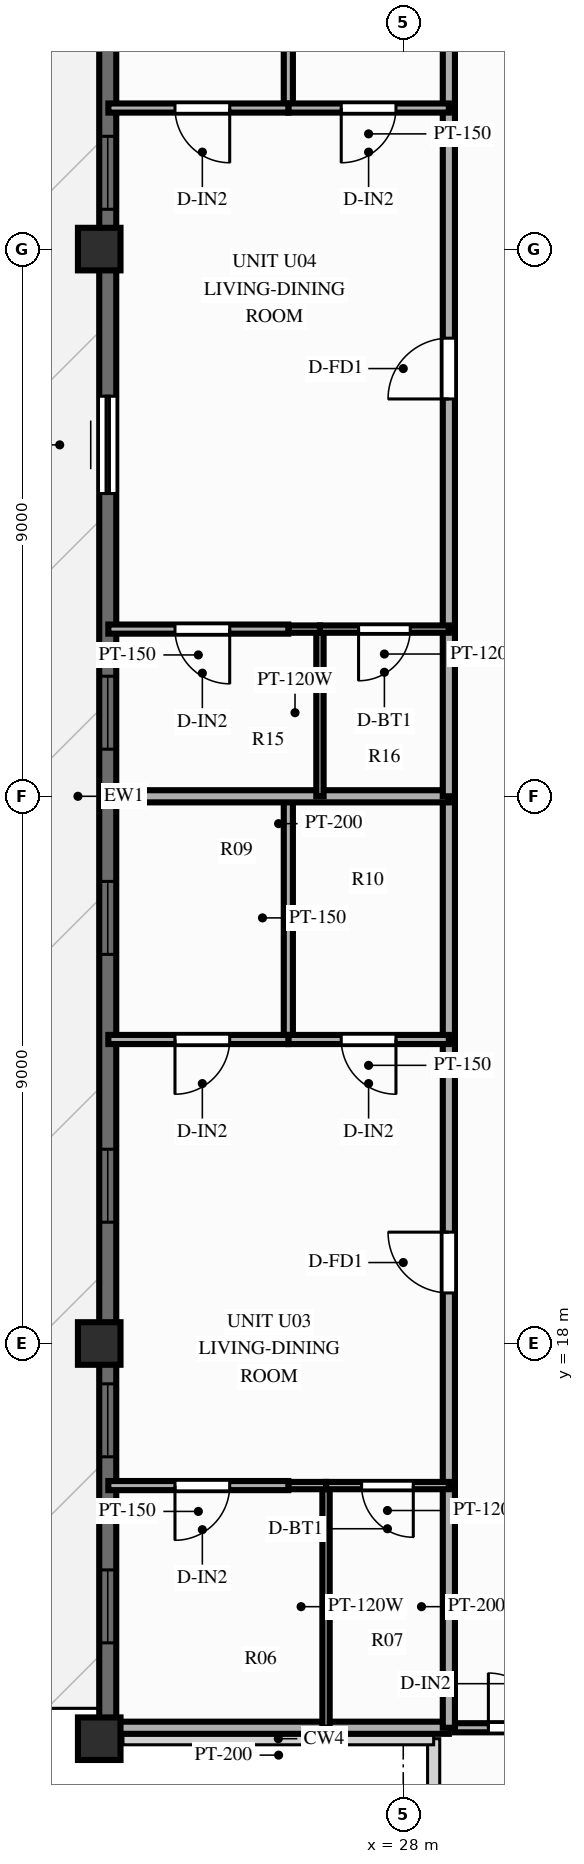
"""IFC4 building model, lengths in metres.
Left out: names, types, materials, properties, quantities, classifications, styles, units other than length and angle.
Written with IfcOpenShell. Run it as: python <this file> out.ifc"""

import sys

from ifc_helpers import new_model, si_unit, direction, frame, frame_2d, origin, origin_2d, place, context, subcontext, project, spatial, rectangle, extrude, source, transform, mapped, element, fill, save


model = new_model("IFC4")
c1 = context("Model", 3, precision=1e-05, world=origin(), true_north=direction((0.0, 1.0)))
c2 = subcontext(c1, "Body", "Model", "MODEL_VIEW")
j1 = project(units=[si_unit("LENGTHUNIT", "METRE"), si_unit("PLANEANGLEUNIT", "RADIAN")], contexts=[c1])
p1 = place(None, origin())
s1 = spatial("IfcSite", under=j1, at=p1, CompositionType="ELEMENT")
p2 = place(p1, origin())
s2 = spatial("IfcBuilding", under=s1, at=p2, CompositionType="ELEMENT")
p3 = place(p2, frame((0.0, 0.0, 246.0)))
s3 = spatial("IfcBuildingStorey", under=s2, at=p3, CompositionType="ELEMENT", Elevation=246.0)
m1 = source(origin(), c2, "Body", "SweptSolid", [
    extrude(rectangle(XDim=0.7, YDim=0.7, at=origin_2d()), origin(), (0.0, 0.0, 1.0), 3.0),
])
for number, where, z_axis, x_axis in (
    (1, (23.0, 36.0, 0.0), (0.0, 0.0, 1.0), (1.0, 0.0, 0.0)),
    (2, (23.0, 18.0, 0.0), (0.0, 0.0, 1.0), (1.0, 0.0, 0.0)),
    (3, (23.0, 11.5, 0.0), (0.0, 0.0, 1.0), (1.0, 0.0, 0.0)),
):
    element("IfcColumn", number, at=place(p3, frame(where, z_axis=z_axis, x_axis=x_axis)), inside=s3, PredefinedType="COLUMN", context=c2, shape_type="MappedRepresentation", body=[
        mapped(m1, transform((0.0, 0.0, 0.0), scale=1.0)),
    ])
p4 = place(p3, frame((23.14, 11.5, 0.0), z_axis=(0.0, 0.0, 1.0), x_axis=(0.0, 1.0, 0.0)))
e4 = element("IfcWall", 4, at=p4, inside=s3, PredefinedType="SOLIDWALL", context=c2, shape_type="SweptSolid", body=[
    extrude(rectangle(XDim=31.0, YDim=0.28, at=frame_2d((15.5, 0.0))), origin(), (0.0, 0.0, 1.0), 2.28),
])
p5 = place(p4, frame((1.577, 0.0, 0.25)))
e5 = element("IfcOpeningElement", 5, at=p5, cuts=e4, PredefinedType="OPENING", context=c2, shape_type="SweptSolid", body=[
    extrude(rectangle(XDim=1.2, YDim=1.5, at=frame_2d((0.6, 0.75))), frame((0.0, 0.152, 0.0), z_axis=(0.0, -1.0, 0.0), x_axis=(1.0, 0.0, 0.0)), (0.0, 0.0, 1.0), 0.304),
])
p6 = place(p4, frame((4.637, 0.0, 0.25)))
e6 = element("IfcOpeningElement", 6, at=p6, cuts=e4, PredefinedType="OPENING", context=c2, shape_type="SweptSolid", body=[
    extrude(rectangle(XDim=1.2, YDim=1.5, at=frame_2d((0.6, 0.75))), frame((0.0, 0.152, 0.0), z_axis=(0.0, -1.0, 0.0), x_axis=(1.0, 0.0, 0.0)), (0.0, 0.0, 1.0), 0.304),
])
p7 = place(p4, frame((8.495, 0.0, 0.25)))
e7 = element("IfcOpeningElement", 7, at=p7, cuts=e4, PredefinedType="OPENING", context=c2, shape_type="SweptSolid", body=[
    extrude(rectangle(XDim=1.2, YDim=1.5, at=frame_2d((0.6, 0.75))), frame((0.0, 0.152, 0.0), z_axis=(0.0, -1.0, 0.0), x_axis=(1.0, 0.0, 0.0)), (0.0, 0.0, 1.0), 0.304),
])
p8 = place(p4, frame((12.9, 0.0, 0.25)))
e8 = element("IfcOpeningElement", 8, at=p8, cuts=e4, PredefinedType="OPENING", context=c2, shape_type="SweptSolid", body=[
    extrude(rectangle(XDim=1.2, YDim=1.5, at=frame_2d((0.6, 0.75))), frame((0.0, 0.152, 0.0), z_axis=(0.0, -1.0, 0.0), x_axis=(1.0, 0.0, 0.0)), (0.0, 0.0, 1.0), 0.304),
])
p9 = place(p4, frame((16.275, 0.0, 0.25)))
e9 = element("IfcOpeningElement", 9, at=p9, cuts=e4, PredefinedType="OPENING", context=c2, shape_type="SweptSolid", body=[
    extrude(rectangle(XDim=1.2, YDim=1.5, at=frame_2d((0.6, 0.75))), frame((0.0, 0.152, 0.0), z_axis=(0.0, -1.0, 0.0), x_axis=(1.0, 0.0, 0.0)), (0.0, 0.0, 1.0), 0.304),
])
p10 = place(p4, frame((20.48, 0.0, 0.0)))
e10 = element("IfcOpeningElement", 10, at=p10, cuts=e4, PredefinedType="OPENING", context=c2, shape_type="SweptSolid", body=[
    extrude(rectangle(XDim=1.6, YDim=2.15, at=frame_2d((0.8, 1.075))), frame((0.0, 0.152, 0.0), z_axis=(0.0, -1.0, 0.0), x_axis=(1.0, 0.0, 0.0)), (0.0, 0.0, 1.0), 0.304),
])
p11 = place(p4, frame((25.155, 0.0, 0.25)))
e11 = element("IfcOpeningElement", 11, at=p11, cuts=e4, PredefinedType="OPENING", context=c2, shape_type="SweptSolid", body=[
    extrude(rectangle(XDim=1.2, YDim=1.5, at=frame_2d((0.6, 0.75))), frame((0.0, 0.152, 0.0), z_axis=(0.0, -1.0, 0.0), x_axis=(1.0, 0.0, 0.0)), (0.0, 0.0, 1.0), 0.304),
])
p12 = place(p4, frame((28.215, 0.0, 0.25)))
e12 = element("IfcOpeningElement", 12, at=p12, cuts=e4, PredefinedType="OPENING", context=c2, shape_type="SweptSolid", body=[
    extrude(rectangle(XDim=1.2, YDim=1.5, at=frame_2d((0.6, 0.75))), frame((0.0, 0.152, 0.0), z_axis=(0.0, -1.0, 0.0), x_axis=(1.0, 0.0, 0.0)), (0.0, 0.0, 1.0), 0.304),
])
p13 = place(p3, frame((28.85, 11.68, 0.0), z_axis=(0.0, 0.0, 1.0), x_axis=(1.0, 0.0, 0.0)))
e13 = element("IfcWall", 13, at=p13, inside=s3, PredefinedType="PARTITIONING", context=c2, shape_type="SweptSolid", body=[
    extrude(rectangle(XDim=2.33, YDim=0.15, at=frame_2d((1.165, 0.0))), origin(), (0.0, 0.0, 1.0), 2.74),
])
p14 = place(p13, frame((0.55, 0.0, 0.0)))
e14 = element("IfcOpeningElement", 14, at=p14, cuts=e13, PredefinedType="OPENING", context=c2, shape_type="SweptSolid", body=[
    extrude(rectangle(XDim=0.9, YDim=2.1, at=frame_2d((0.45, 1.05))), frame((0.0, 0.087, 0.0), z_axis=(0.0, -1.0, 0.0), x_axis=(1.0, 0.0, 0.0)), (0.0, 0.0, 1.0), 0.174),
])
p15 = place(p3, frame((28.75, 11.68, 0.0), z_axis=(0.0, 0.0, 1.0), x_axis=(-1.0, 0.0, 0.0)))
e15 = element("IfcWall", 15, at=p15, inside=s3, PredefinedType="PARTITIONING", context=c2, shape_type="SweptSolid", body=[
    extrude(rectangle(XDim=5.6, YDim=0.2, at=frame_2d((2.8, 0.0))), origin(), (0.0, 0.0, 1.0), 2.74),
])
p16 = place(p3, frame((28.75, 11.68, 0.0), z_axis=(0.0, 0.0, 1.0), x_axis=(0.0, 1.0, 0.0)))
e16 = element("IfcWall", 16, at=p16, inside=s3, PredefinedType="PARTITIONING", context=c2, shape_type="SweptSolid", body=[
    extrude(rectangle(XDim=3.983, YDim=0.2, at=frame_2d((1.992, 0.0))), origin(), (0.0, 0.0, 1.0), 2.74),
])
p17 = place(p3, frame((28.75, 15.663, 0.0), z_axis=(0.0, 0.0, 1.0), x_axis=(0.0, 1.0, 0.0)))
e17 = element("IfcWall", 17, at=p17, inside=s3, PredefinedType="PARTITIONING", context=c2, shape_type="SweptSolid", body=[
    extrude(rectangle(XDim=7.337, YDim=0.2, at=frame_2d((3.668, 0.0))), origin(), (0.0, 0.0, 1.0), 2.74),
])
p18 = place(p17, frame((3.168, 0.0, 0.0)))
e18 = element("IfcOpeningElement", 18, at=p18, cuts=e17, PredefinedType="OPENING", context=c2, shape_type="SweptSolid", body=[
    extrude(rectangle(XDim=1.0, YDim=2.15, at=frame_2d((0.5, 1.075))), frame((0.0, 0.112, 0.0), z_axis=(0.0, -1.0, 0.0), x_axis=(1.0, 0.0, 0.0)), (0.0, 0.0, 1.0), 0.224),
])
p19 = place(p3, frame((28.75, 23.0, 0.0), z_axis=(0.0, 0.0, 1.0), x_axis=(0.0, 1.0, 0.0)))
e19 = element("IfcWall", 19, at=p19, inside=s3, PredefinedType="PARTITIONING", context=c2, shape_type="SweptSolid", body=[
    extrude(rectangle(XDim=4.0, YDim=0.2, at=frame_2d((2.0, 0.0))), origin(), (0.0, 0.0, 1.0), 2.74),
])
p20 = place(p3, frame((26.73, 11.68, 0.0), z_axis=(0.0, 0.0, 1.0), x_axis=(0.0, 1.0, 0.0)))
e20 = element("IfcWall", 20, at=p20, inside=s3, PredefinedType="PARTITIONING", context=c2, shape_type="SweptSolid", body=[
    extrude(rectangle(XDim=3.983, YDim=0.12, at=frame_2d((1.992, 0.0))), origin(), (0.0, 0.0, 1.0), 2.74),
])
p21 = place(p3, frame((26.11, 23.0, 0.0), z_axis=(0.0, 0.0, 1.0), x_axis=(0.0, 1.0, 0.0)))
e21 = element("IfcWall", 21, at=p21, inside=s3, PredefinedType="PARTITIONING", context=c2, shape_type="SweptSolid", body=[
    extrude(rectangle(XDim=4.0, YDim=0.15, at=frame_2d((2.0, 0.0))), origin(), (0.0, 0.0, 1.0), 2.74),
])
p22 = place(p3, frame((28.75, 15.663, 0.0), z_axis=(0.0, 0.0, 1.0), x_axis=(-1.0, 0.0, 0.0)))
e22 = element("IfcWall", 22, at=p22, inside=s3, PredefinedType="PARTITIONING", context=c2, shape_type="SweptSolid", body=[
    extrude(rectangle(XDim=2.02, YDim=0.12, at=frame_2d((1.01, 0.0))), origin(), (0.0, 0.0, 1.0), 2.74),
])
p23 = place(p22, frame((0.585, 0.0, 0.0)))
e23 = element("IfcOpeningElement", 23, at=p23, cuts=e22, PredefinedType="OPENING", context=c2, shape_type="SweptSolid", body=[
    extrude(rectangle(XDim=0.85, YDim=2.05, at=frame_2d((0.425, 1.025))), frame((0.0, 0.072, 0.0), z_axis=(0.0, -1.0, 0.0), x_axis=(1.0, 0.0, 0.0)), (0.0, 0.0, 1.0), 0.144),
])
p24 = place(p3, frame((26.73, 15.663, 0.0), z_axis=(0.0, 0.0, 1.0), x_axis=(-1.0, 0.0, 0.0)))
e24 = element("IfcWall", 24, at=p24, inside=s3, PredefinedType="PARTITIONING", context=c2, shape_type="SweptSolid", body=[
    extrude(rectangle(XDim=0.62, YDim=0.12, at=frame_2d((0.31, 0.0))), origin(), (0.0, 0.0, 1.0), 2.74),
])
p25 = place(p3, frame((26.11, 15.663, 0.0), z_axis=(0.0, 0.0, 1.0), x_axis=(-1.0, 0.0, 0.0)))
e25 = element("IfcWall", 25, at=p25, inside=s3, PredefinedType="PARTITIONING", context=c2, shape_type="SweptSolid", body=[
    extrude(rectangle(XDim=2.96, YDim=0.15, at=frame_2d((1.48, 0.0))), origin(), (0.0, 0.0, 1.0), 2.74),
])
p26 = place(p25, frame((0.964, 0.0, 0.0)))
e26 = element("IfcOpeningElement", 26, at=p26, cuts=e25, PredefinedType="OPENING", context=c2, shape_type="SweptSolid", body=[
    extrude(rectangle(XDim=0.9, YDim=2.1, at=frame_2d((0.45, 1.05))), frame((0.0, 0.087, 0.0), z_axis=(0.0, -1.0, 0.0), x_axis=(1.0, 0.0, 0.0)), (0.0, 0.0, 1.0), 0.174),
])
p27 = place(p3, frame((28.75, 23.0, 0.0), z_axis=(0.0, 0.0, 1.0), x_axis=(-1.0, 0.0, 0.0)))
e27 = element("IfcWall", 27, at=p27, inside=s3, PredefinedType="PARTITIONING", context=c2, shape_type="SweptSolid", body=[
    extrude(rectangle(XDim=2.64, YDim=0.15, at=frame_2d((1.32, 0.0))), origin(), (0.0, 0.0, 1.0), 2.74),
])
p28 = place(p27, frame((0.87, 0.0, 0.0)))
e28 = element("IfcOpeningElement", 28, at=p28, cuts=e27, PredefinedType="OPENING", context=c2, shape_type="SweptSolid", body=[
    extrude(rectangle(XDim=0.9, YDim=2.1, at=frame_2d((0.45, 1.05))), frame((0.0, 0.087, 0.0), z_axis=(0.0, -1.0, 0.0), x_axis=(1.0, 0.0, 0.0)), (0.0, 0.0, 1.0), 0.174),
])
p29 = place(p3, frame((26.11, 23.0, 0.0), z_axis=(0.0, 0.0, 1.0), x_axis=(-1.0, 0.0, 0.0)))
e29 = element("IfcWall", 29, at=p29, inside=s3, PredefinedType="PARTITIONING", context=c2, shape_type="SweptSolid", body=[
    extrude(rectangle(XDim=2.96, YDim=0.15, at=frame_2d((1.48, 0.0))), origin(), (0.0, 0.0, 1.0), 2.74),
])
p30 = place(p29, frame((0.964, 0.0, 0.0)))
e30 = element("IfcOpeningElement", 30, at=p30, cuts=e29, PredefinedType="OPENING", context=c2, shape_type="SweptSolid", body=[
    extrude(rectangle(XDim=0.9, YDim=2.1, at=frame_2d((0.45, 1.05))), frame((0.0, 0.087, 0.0), z_axis=(0.0, -1.0, 0.0), x_axis=(1.0, 0.0, 0.0)), (0.0, 0.0, 1.0), 0.174),
])
p31 = place(p3, frame((28.75, 27.0, 0.0), z_axis=(0.0, 0.0, 1.0), x_axis=(-1.0, 0.0, 0.0)))
e31 = element("IfcWall", 31, at=p31, inside=s3, PredefinedType="PARTITIONING", context=c2, shape_type="SweptSolid", body=[
    extrude(rectangle(XDim=5.6, YDim=0.2, at=frame_2d((2.8, 0.0))), origin(), (0.0, 0.0, 1.0), 2.74),
])
p32 = place(p3, frame((28.75, 27.0, 0.0), z_axis=(0.0, 0.0, 1.0), x_axis=(0.0, 1.0, 0.0)))
e32 = element("IfcWall", 32, at=p32, inside=s3, PredefinedType="PARTITIONING", context=c2, shape_type="SweptSolid", body=[
    extrude(rectangle(XDim=2.75, YDim=0.2, at=frame_2d((1.375, 0.0))), origin(), (0.0, 0.0, 1.0), 2.74),
])
p33 = place(p3, frame((28.75, 29.75, 0.0), z_axis=(0.0, 0.0, 1.0), x_axis=(0.0, 1.0, 0.0)))
e33 = element("IfcWall", 33, at=p33, inside=s3, PredefinedType="PARTITIONING", context=c2, shape_type="SweptSolid", body=[
    extrude(rectangle(XDim=8.57, YDim=0.2, at=frame_2d((4.285, 0.0))), origin(), (0.0, 0.0, 1.0), 2.74),
])
p34 = place(p33, frame((3.785, 0.0, 0.0)))
e34 = element("IfcOpeningElement", 34, at=p34, cuts=e33, PredefinedType="OPENING", context=c2, shape_type="SweptSolid", body=[
    extrude(rectangle(XDim=1.0, YDim=2.15, at=frame_2d((0.5, 1.075))), frame((0.0, 0.112, 0.0), z_axis=(0.0, -1.0, 0.0), x_axis=(1.0, 0.0, 0.0)), (0.0, 0.0, 1.0), 0.224),
])
p35 = place(p3, frame((28.75, 38.32, 0.0), z_axis=(0.0, 0.0, 1.0), x_axis=(0.0, 1.0, 0.0)))
e35 = element("IfcWall", 35, at=p35, inside=s3, PredefinedType="PARTITIONING", context=c2, shape_type="SweptSolid", body=[
    extrude(rectangle(XDim=4.0, YDim=0.2, at=frame_2d((2.0, 0.0))), origin(), (0.0, 0.0, 1.0), 2.74),
])
p36 = place(p3, frame((26.63, 27.0, 0.0), z_axis=(0.0, 0.0, 1.0), x_axis=(0.0, 1.0, 0.0)))
e36 = element("IfcWall", 36, at=p36, inside=s3, PredefinedType="PARTITIONING", context=c2, shape_type="SweptSolid", body=[
    extrude(rectangle(XDim=2.75, YDim=0.12, at=frame_2d((1.375, 0.0))), origin(), (0.0, 0.0, 1.0), 2.49),
])
p37 = place(p3, frame((26.11, 38.32, 0.0), z_axis=(0.0, 0.0, 1.0), x_axis=(0.0, 1.0, 0.0)))
e37 = element("IfcWall", 37, at=p37, inside=s3, PredefinedType="PARTITIONING", context=c2, shape_type="SweptSolid", body=[
    extrude(rectangle(XDim=4.0, YDim=0.15, at=frame_2d((2.0, 0.0))), origin(), (0.0, 0.0, 1.0), 2.74),
])
p38 = place(p3, frame((28.75, 29.75, 0.0), z_axis=(0.0, 0.0, 1.0), x_axis=(-1.0, 0.0, 0.0)))
e38 = element("IfcWall", 38, at=p38, inside=s3, PredefinedType="PARTITIONING", context=c2, shape_type="SweptSolid", body=[
    extrude(rectangle(XDim=2.12, YDim=0.12, at=frame_2d((1.06, 0.0))), origin(), (0.0, 0.0, 1.0), 2.74),
])
p39 = place(p38, frame((0.635, 0.0, 0.0)))
e39 = element("IfcOpeningElement", 39, at=p39, cuts=e38, PredefinedType="OPENING", context=c2, shape_type="SweptSolid", body=[
    extrude(rectangle(XDim=0.85, YDim=2.05, at=frame_2d((0.425, 1.025))), frame((0.0, 0.072, 0.0), z_axis=(0.0, -1.0, 0.0), x_axis=(1.0, 0.0, 0.0)), (0.0, 0.0, 1.0), 0.144),
])
p40 = place(p3, frame((26.63, 29.75, 0.0), z_axis=(0.0, 0.0, 1.0), x_axis=(-1.0, 0.0, 0.0)))
e40 = element("IfcWall", 40, at=p40, inside=s3, PredefinedType="PARTITIONING", context=c2, shape_type="SweptSolid", body=[
    extrude(rectangle(XDim=0.52, YDim=0.12, at=frame_2d((0.26, 0.0))), origin(), (0.0, 0.0, 1.0), 2.74),
])
p41 = place(p3, frame((26.11, 29.75, 0.0), z_axis=(0.0, 0.0, 1.0), x_axis=(-1.0, 0.0, 0.0)))
e41 = element("IfcWall", 41, at=p41, inside=s3, PredefinedType="PARTITIONING", context=c2, shape_type="SweptSolid", body=[
    extrude(rectangle(XDim=2.96, YDim=0.15, at=frame_2d((1.48, 0.0))), origin(), (0.0, 0.0, 1.0), 2.74),
])
p42 = place(p41, frame((0.964, 0.0, 0.0)))
e42 = element("IfcOpeningElement", 42, at=p42, cuts=e41, PredefinedType="OPENING", context=c2, shape_type="SweptSolid", body=[
    extrude(rectangle(XDim=0.9, YDim=2.1, at=frame_2d((0.45, 1.05))), frame((0.0, 0.087, 0.0), z_axis=(0.0, -1.0, 0.0), x_axis=(1.0, 0.0, 0.0)), (0.0, 0.0, 1.0), 0.174),
])
p43 = place(p3, frame((28.75, 38.32, 0.0), z_axis=(0.0, 0.0, 1.0), x_axis=(-1.0, 0.0, 0.0)))
e43 = element("IfcWall", 43, at=p43, inside=s3, PredefinedType="PARTITIONING", context=c2, shape_type="SweptSolid", body=[
    extrude(rectangle(XDim=2.64, YDim=0.15, at=frame_2d((1.32, 0.0))), origin(), (0.0, 0.0, 1.0), 2.74),
])
p44 = place(p43, frame((0.87, 0.0, 0.0)))
e44 = element("IfcOpeningElement", 44, at=p44, cuts=e43, PredefinedType="OPENING", context=c2, shape_type="SweptSolid", body=[
    extrude(rectangle(XDim=0.9, YDim=2.1, at=frame_2d((0.45, 1.05))), frame((0.0, 0.087, 0.0), z_axis=(0.0, -1.0, 0.0), x_axis=(1.0, 0.0, 0.0)), (0.0, 0.0, 1.0), 0.174),
])
p45 = place(p3, frame((26.11, 38.32, 0.0), z_axis=(0.0, 0.0, 1.0), x_axis=(-1.0, 0.0, 0.0)))
e45 = element("IfcWall", 45, at=p45, inside=s3, PredefinedType="PARTITIONING", context=c2, shape_type="SweptSolid", body=[
    extrude(rectangle(XDim=2.96, YDim=0.15, at=frame_2d((1.48, 0.0))), origin(), (0.0, 0.0, 1.0), 2.74),
])
p46 = place(p45, frame((0.964, 0.0, 0.0)))
e46 = element("IfcOpeningElement", 46, at=p46, cuts=e45, PredefinedType="OPENING", context=c2, shape_type="SweptSolid", body=[
    extrude(rectangle(XDim=0.9, YDim=2.1, at=frame_2d((0.45, 1.05))), frame((0.0, 0.087, 0.0), z_axis=(0.0, -1.0, 0.0), x_axis=(1.0, 0.0, 0.0)), (0.0, 0.0, 1.0), 0.174),
])
m2 = source(origin(), c2, "Body", "SweptSolid", [
    extrude(rectangle(XDim=1.2, YDim=1.5, at=frame_2d((0.6, 0.75))), frame((0.0, 0.03, 0.0), z_axis=(0.0, -1.0, 0.0), x_axis=(1.0, 0.0, 0.0)), (0.0, 0.0, 1.0), 0.06),
])
p47 = place(p5, origin())
e47 = element("IfcWindow", 47, at=p47, inside=s3, PartitioningType="SINGLE_PANEL", PredefinedType="WINDOW", context=c2, shape_type="MappedRepresentation", body=[
    mapped(m2, transform((0.0, 0.0, 0.0), scale=1.0)),
])
fill(e5, e47)
p48 = place(p6, origin())
e48 = element("IfcWindow", 48, at=p48, inside=s3, PartitioningType="SINGLE_PANEL", PredefinedType="WINDOW", context=c2, shape_type="MappedRepresentation", body=[
    mapped(m2, transform((0.0, 0.0, 0.0), scale=1.0)),
])
fill(e6, e48)
p49 = place(p7, origin())
e49 = element("IfcWindow", 49, at=p49, inside=s3, PartitioningType="SINGLE_PANEL", PredefinedType="WINDOW", context=c2, shape_type="MappedRepresentation", body=[
    mapped(m2, transform((0.0, 0.0, 0.0), scale=1.0)),
])
fill(e7, e49)
p50 = place(p8, origin())
e50 = element("IfcWindow", 50, at=p50, inside=s3, PartitioningType="SINGLE_PANEL", PredefinedType="WINDOW", context=c2, shape_type="MappedRepresentation", body=[
    mapped(m2, transform((0.0, 0.0, 0.0), scale=1.0)),
])
fill(e8, e50)
p51 = place(p9, origin())
e51 = element("IfcWindow", 51, at=p51, inside=s3, PartitioningType="SINGLE_PANEL", PredefinedType="WINDOW", context=c2, shape_type="MappedRepresentation", body=[
    mapped(m2, transform((0.0, 0.0, 0.0), scale=1.0)),
])
fill(e9, e51)
m3 = source(origin(), c2, "Body", "SweptSolid", [
    extrude(rectangle(XDim=1.6, YDim=2.15, at=frame_2d((0.8, 1.075))), frame((0.0, 0.025, 0.0), z_axis=(0.0, -1.0, 0.0), x_axis=(1.0, 0.0, 0.0)), (0.0, 0.0, 1.0), 0.05),
])
p52 = place(p10, origin())
e52 = element("IfcDoor", 52, at=p52, inside=s3, OperationType="SLIDING_TO_LEFT", PredefinedType="DOOR", context=c2, shape_type="MappedRepresentation", body=[
    mapped(m3, transform((0.0, 0.0, 0.0), scale=1.0)),
])
fill(e10, e52)
p53 = place(p11, origin())
e53 = element("IfcWindow", 53, at=p53, inside=s3, PartitioningType="SINGLE_PANEL", PredefinedType="WINDOW", context=c2, shape_type="MappedRepresentation", body=[
    mapped(m2, transform((0.0, 0.0, 0.0), scale=1.0)),
])
fill(e11, e53)
m4 = source(origin(), c2, "Body", "SweptSolid", [
    extrude(rectangle(XDim=0.9, YDim=2.1, at=frame_2d((0.45, 1.05))), frame((0.0, 0.025, 0.0), z_axis=(0.0, -1.0, 0.0), x_axis=(1.0, 0.0, 0.0)), (0.0, 0.0, 1.0), 0.05),
])
p54 = place(p14, origin())
e54 = element("IfcDoor", 54, at=p54, inside=s3, OperationType="SINGLE_SWING_LEFT", PredefinedType="DOOR", context=c2, shape_type="MappedRepresentation", body=[
    mapped(m4, transform((0.0, 0.0, 0.0), scale=1.0)),
])
fill(e14, e54)
m5 = source(origin(), c2, "Body", "SweptSolid", [
    extrude(rectangle(XDim=1.0, YDim=2.15, at=frame_2d((0.5, 1.075))), frame((0.0, 0.025, 0.0), z_axis=(0.0, -1.0, 0.0), x_axis=(1.0, 0.0, 0.0)), (0.0, 0.0, 1.0), 0.05),
])
p55 = place(p18, origin())
e55 = element("IfcDoor", 55, at=p55, inside=s3, OperationType="SINGLE_SWING_RIGHT", PredefinedType="DOOR", context=c2, shape_type="MappedRepresentation", body=[
    mapped(m5, transform((0.0, 0.0, 0.0), scale=1.0)),
])
fill(e18, e55)
m6 = source(origin(), c2, "Body", "SweptSolid", [
    extrude(rectangle(XDim=0.85, YDim=2.05, at=frame_2d((0.425, 1.025))), frame((0.0, 0.025, 0.0), z_axis=(0.0, -1.0, 0.0), x_axis=(1.0, 0.0, 0.0)), (0.0, 0.0, 1.0), 0.05),
])
p56 = place(p23, origin())
e56 = element("IfcDoor", 56, at=p56, inside=s3, OperationType="SINGLE_SWING_LEFT", PredefinedType="DOOR", context=c2, shape_type="MappedRepresentation", body=[
    mapped(m6, transform((0.0, 0.0, 0.0), scale=1.0)),
])
fill(e23, e56)
p57 = place(p26, origin())
e57 = element("IfcDoor", 57, at=p57, inside=s3, OperationType="SINGLE_SWING_RIGHT", PredefinedType="DOOR", context=c2, shape_type="MappedRepresentation", body=[
    mapped(m4, transform((0.0, 0.0, 0.0), scale=1.0)),
])
fill(e26, e57)
p58 = place(p28, origin())
e58 = element("IfcDoor", 58, at=p58, inside=s3, OperationType="SINGLE_SWING_LEFT", PredefinedType="DOOR", context=c2, shape_type="MappedRepresentation", body=[
    mapped(m4, transform((0.0, 0.0, 0.0), scale=1.0)),
])
fill(e28, e58)
p59 = place(p30, origin())
e59 = element("IfcDoor", 59, at=p59, inside=s3, OperationType="SINGLE_SWING_RIGHT", PredefinedType="DOOR", context=c2, shape_type="MappedRepresentation", body=[
    mapped(m4, transform((0.0, 0.0, 0.0), scale=1.0)),
])
fill(e30, e59)
p60 = place(p34, origin())
e60 = element("IfcDoor", 60, at=p60, inside=s3, OperationType="SINGLE_SWING_LEFT", PredefinedType="DOOR", context=c2, shape_type="MappedRepresentation", body=[
    mapped(m5, transform((0.0, 0.0, 0.0), scale=1.0)),
])
fill(e34, e60)
p61 = place(p39, origin())
e61 = element("IfcDoor", 61, at=p61, inside=s3, OperationType="SINGLE_SWING_RIGHT", PredefinedType="DOOR", context=c2, shape_type="MappedRepresentation", body=[
    mapped(m6, transform((0.0, 0.0, 0.0), scale=1.0)),
])
fill(e39, e61)
p62 = place(p42, origin())
e62 = element("IfcDoor", 62, at=p62, inside=s3, OperationType="SINGLE_SWING_LEFT", PredefinedType="DOOR", context=c2, shape_type="MappedRepresentation", body=[
    mapped(m4, transform((0.0, 0.0, 0.0), scale=1.0)),
])
fill(e42, e62)
p63 = place(p44, origin())
e63 = element("IfcDoor", 63, at=p63, inside=s3, OperationType="SINGLE_SWING_RIGHT", PredefinedType="DOOR", context=c2, shape_type="MappedRepresentation", body=[
    mapped(m4, transform((0.0, 0.0, 0.0), scale=1.0)),
])
fill(e44, e63)
p64 = place(p46, origin())
e64 = element("IfcDoor", 64, at=p64, inside=s3, OperationType="SINGLE_SWING_LEFT", PredefinedType="DOOR", context=c2, shape_type="MappedRepresentation", body=[
    mapped(m4, transform((0.0, 0.0, 0.0), scale=1.0)),
])
fill(e46, e64)
save(model, sys.argv[1])
